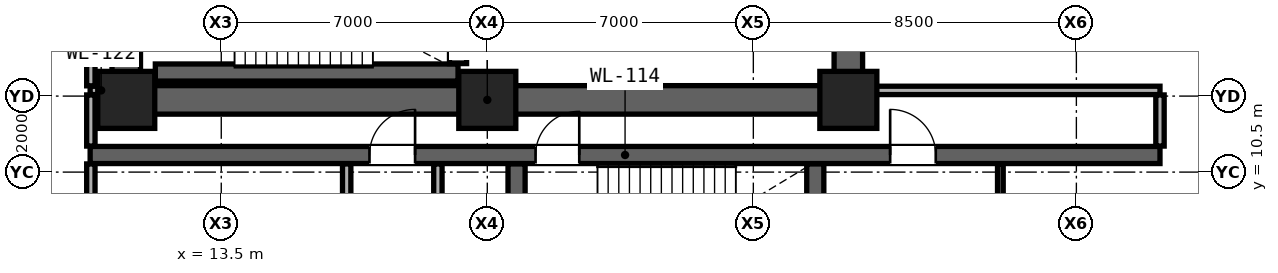
"""IFC4 building model, lengths in metres.
Left out: names, types, materials, properties, quantities, classifications, styles, units other than length and angle.
Written with IfcOpenShell. Run it as: python <this file> out.ifc"""

import sys

from ifc_helpers import new_model, si_unit, direction, frame, frame_2d, origin, origin_2d, place, context, subcontext, project, spatial, rectangle, extrude, element, fill, save


model = new_model("IFC4")
c1 = context("Model", 3, precision=1e-05, world=origin(), true_north=direction((0.0, 1.0)))
c2 = subcontext(c1, "Body", "Model", "MODEL_VIEW")
j1 = project(units=[si_unit("LENGTHUNIT", "METRE"), si_unit("PLANEANGLEUNIT", "RADIAN")], contexts=[c1])
p1 = place(None, origin())
s1 = spatial("IfcSite", under=j1, at=p1, CompositionType="ELEMENT")
p2 = place(p1, origin())
s2 = spatial("IfcBuilding", under=s1, at=p2, CompositionType="ELEMENT")
p3 = place(p2, origin())
s3 = spatial("IfcBuildingStorey", under=s2, at=p3, CompositionType="ELEMENT", Elevation=0.0)
for number, where, z_axis, x_axis in (
    (1, (11.0, 12.4, 0.0), (0.0, 0.0, 1.0), (1.0, 0.0, 0.0)),
    (2, (20.5, 12.4, 0.0), (0.0, 0.0, 1.0), (1.0, 0.0, 0.0)),
    (3, (30.0, 12.4, 0.0), (0.0, 0.0, 1.0), (1.0, 0.0, 0.0)),
):
    element("IfcColumn", number, at=place(p3, frame(where, z_axis=z_axis, x_axis=x_axis)), inside=s3, PredefinedType="COLUMN", context=c2, shape_type="SweptSolid", body=[
        extrude(rectangle(XDim=1.5, YDim=1.5, at=origin_2d()), origin(), (0.0, 0.0, 1.0), 5.2),
    ])
p4 = place(p3, frame((11.0, 12.4, 0.0), z_axis=(0.0, 0.0, 1.0), x_axis=(1.0, 0.0, 0.0)))
e4 = element("IfcWall", 4, at=p4, inside=s3, PredefinedType="SHEAR", context=c2, shape_type="SweptSolid", body=[
    extrude(rectangle(XDim=19.0, YDim=0.75, at=frame_2d((9.5, 0.0))), origin(), (0.0, 0.0, 1.0), 4.88),
])
for number, where, z_axis, x_axis in (
    (5, (11.0, 12.4, 0.0), (0.0, 0.0, 1.0), (0.0, 1.0, 0.0)),
    (6, (30.0, 12.4, 0.0), (0.0, 0.0, 1.0), (0.0, 1.0, 0.0)),
):
    element("IfcWall", number, at=place(p3, frame(where, z_axis=z_axis, x_axis=x_axis)), inside=s3, PredefinedType="SHEAR", context=c2, shape_type="SweptSolid", body=[
        extrude(rectangle(XDim=6.0, YDim=0.75, at=frame_2d((3.0, 0.0))), origin(), (0.0, 0.0, 1.0), 4.88),
    ])
p5 = place(p3, frame((10.05, 10.95, 0.0), z_axis=(0.0, 0.0, 1.0), x_axis=(1.0, 0.0, 0.0)))
e7 = element("IfcWall", 7, at=p5, inside=s3, PredefinedType="SHEAR", context=c2, shape_type="SweptSolid", body=[
    extrude(rectangle(XDim=28.15, YDim=0.45, at=frame_2d((14.075, 0.0))), origin(), (0.0, 0.0, 1.0), 4.88),
])
p6 = place(p5, frame((7.35, 0.0, 0.0)))
e8 = element("IfcOpeningElement", 8, at=p6, cuts=e7, PredefinedType="OPENING", context=c2, shape_type="SweptSolid", body=[
    extrude(rectangle(XDim=1.2, YDim=2.25, at=frame_2d((0.6, 1.125))), frame((0.0, 0.235, 0.0), z_axis=(0.0, -1.0, 0.0), x_axis=(1.0, 0.0, 0.0)), (0.0, 0.0, 1.0), 0.47),
])
p7 = place(p5, frame((11.72, 0.0, 0.0)))
e9 = element("IfcOpeningElement", 9, at=p7, cuts=e7, PredefinedType="OPENING", context=c2, shape_type="SweptSolid", body=[
    extrude(rectangle(XDim=1.15, YDim=2.2, at=frame_2d((0.575, 1.1))), frame((0.0, 0.235, 0.0), z_axis=(0.0, -1.0, 0.0), x_axis=(1.0, 0.0, 0.0)), (0.0, 0.0, 1.0), 0.47),
])
p8 = place(p5, frame((21.05, 0.0, 0.0)))
e10 = element("IfcOpeningElement", 10, at=p8, cuts=e7, PredefinedType="OPENING", context=c2, shape_type="SweptSolid", body=[
    extrude(rectangle(XDim=1.2, YDim=2.25, at=frame_2d((0.6, 1.125))), frame((0.0, 0.235, 0.0), z_axis=(0.0, -1.0, 0.0), x_axis=(1.0, 0.0, 0.0)), (0.0, 0.0, 1.0), 0.47),
])
p9 = place(p3, frame((10.05, 12.65, 0.0), z_axis=(0.0, 0.0, 1.0), x_axis=(1.0, 0.0, 0.0)))
e11 = element("IfcWall", 11, at=p9, inside=s3, PredefinedType="SOLIDWALL", context=c2, shape_type="SweptSolid", body=[
    extrude(rectangle(XDim=0.58, YDim=0.22, at=frame_2d((0.29, 0.0))), origin(), (0.0, 0.0, 1.0), 4.88),
])
p10 = place(p3, frame((30.37, 12.65, 0.0), z_axis=(0.0, 0.0, 1.0), x_axis=(1.0, 0.0, 0.0)))
e12 = element("IfcWall", 12, at=p10, inside=s3, PredefinedType="SOLIDWALL", context=c2, shape_type="SweptSolid", body=[
    extrude(rectangle(XDim=7.83, YDim=0.22, at=frame_2d((3.915, 0.0))), origin(), (0.0, 0.0, 1.0), 3.924),
])
p11 = place(p3, frame((11.765, 13.12, 0.0), z_axis=(0.0, 0.0, 1.0), x_axis=(1.0, 0.0, 0.0)))
e13 = element("IfcWall", 13, at=p11, inside=s3, PredefinedType="SHEAR", context=c2, shape_type="SweptSolid", body=[
    extrude(rectangle(XDim=7.965, YDim=0.45, at=frame_2d((3.982, 0.0))), origin(), (0.0, 0.0, 1.0), 4.88),
])
p12 = place(p3, frame((10.069, 6.92, 0.0), z_axis=(0.0, 0.0, 1.0), x_axis=(0.0, 1.0, 0.0)))
e14 = element("IfcWall", 14, at=p12, inside=s3, PredefinedType="SOLIDWALL", context=c2, shape_type="SweptSolid", body=[
    extrude(rectangle(XDim=3.795, YDim=0.22, at=frame_2d((1.897, 0.0))), origin(), (0.0, 0.0, 1.0), 4.88),
])
p13 = place(p3, frame((10.069, 11.185, 0.0), z_axis=(0.0, 0.0, 1.0), x_axis=(0.0, 1.0, 0.0)))
e15 = element("IfcWall", 15, at=p13, inside=s3, PredefinedType="SOLIDWALL", context=c2, shape_type="SweptSolid", body=[
    extrude(rectangle(XDim=1.345, YDim=0.22, at=frame_2d((0.672, 0.0))), origin(), (0.0, 0.0, 1.0), 4.88),
])
p14 = place(p3, frame((10.069, 12.77, 0.0), z_axis=(0.0, 0.0, 1.0), x_axis=(0.0, 1.0, 0.0)))
e16 = element("IfcWall", 16, at=p14, inside=s3, PredefinedType="SOLIDWALL", context=c2, shape_type="SweptSolid", body=[
    extrude(rectangle(XDim=5.51, YDim=0.22, at=frame_2d((2.755, 0.0))), origin(), (0.0, 0.0, 1.0), 3.772),
])
for number, where, z_axis, x_axis in (
    (17, (16.8, 2.15, 0.0), (0.0, 0.0, 1.0), (0.0, 1.0, 0.0)),
    (18, (19.2, 2.15, 0.0), (0.0, 0.0, 1.0), (0.0, 1.0, 0.0)),
):
    element("IfcWall", number, at=place(p3, frame(where, z_axis=z_axis, x_axis=x_axis)), inside=s3, PredefinedType="SOLIDWALL", context=c2, shape_type="SweptSolid", body=[
        extrude(rectangle(XDim=8.565, YDim=0.22, at=frame_2d((4.283, 0.0))), origin(), (0.0, 0.0, 1.0), 4.099),
    ])
p15 = place(p3, frame((19.73, 13.355, 0.0), z_axis=(0.0, 0.0, 1.0), x_axis=(0.0, 1.0, 0.0)))
e19 = element("IfcWall", 19, at=p15, inside=s3, PredefinedType="SHEAR", context=c2, shape_type="SweptSolid", body=[
    extrude(rectangle(XDim=2.73, YDim=0.45, at=frame_2d((1.365, 0.0))), origin(), (0.0, 0.0, 1.0), 4.88),
])
for number, where, z_axis, x_axis in (
    (20, (21.27, 7.455, 0.0), (0.0, 0.0, 1.0), (0.0, 1.0, 0.0)),
    (21, (29.13, 7.455, 0.0), (0.0, 0.0, 1.0), (0.0, 1.0, 0.0)),
):
    element("IfcWall", number, at=place(p3, frame(where, z_axis=z_axis, x_axis=x_axis)), inside=s3, PredefinedType="SHEAR", context=c2, shape_type="SweptSolid", body=[
        extrude(rectangle(XDim=3.26, YDim=0.45, at=frame_2d((1.63, 0.0))), origin(), (0.0, 0.0, 1.0), 4.88),
    ])
p16 = place(p3, frame((34.0, 2.4, 0.0), z_axis=(0.0, 0.0, 1.0), x_axis=(0.0, 1.0, 0.0)))
e22 = element("IfcWall", 22, at=p16, inside=s3, PredefinedType="PARTITIONING", context=c2, shape_type="SweptSolid", body=[
    extrude(rectangle(XDim=8.315, YDim=0.15, at=frame_2d((4.158, 0.0))), origin(), (0.0, 0.0, 1.0), 4.099),
])
p17 = place(p3, frame((38.2, 11.185, 0.0), z_axis=(0.0, 0.0, 1.0), x_axis=(0.0, 1.0, 0.0)))
e23 = element("IfcWall", 23, at=p17, inside=s3, PredefinedType="SOLIDWALL", context=c2, shape_type="SweptSolid", body=[
    extrude(rectangle(XDim=1.345, YDim=0.22, at=frame_2d((0.672, 0.0))), origin(), (0.0, 0.0, 1.0), 3.924),
])
p18 = place(p6, origin())
e24 = element("IfcDoor", 24, at=p18, inside=s3, OperationType="SINGLE_SWING_RIGHT", PredefinedType="DOOR", context=c2, shape_type="SweptSolid", body=[
    extrude(rectangle(XDim=1.2, YDim=2.25, at=frame_2d((0.6, 1.125))), frame((0.0, 0.025, 0.0), z_axis=(0.0, -1.0, 0.0), x_axis=(1.0, 0.0, 0.0)), (0.0, 0.0, 1.0), 0.05),
])
fill(e8, e24)
p19 = place(p7, origin())
e25 = element("IfcDoor", 25, at=p19, inside=s3, OperationType="SINGLE_SWING_RIGHT", PredefinedType="DOOR", context=c2, shape_type="SweptSolid", body=[
    extrude(rectangle(XDim=1.15, YDim=2.2, at=frame_2d((0.575, 1.1))), frame((0.0, 0.025, 0.0), z_axis=(0.0, -1.0, 0.0), x_axis=(1.0, 0.0, 0.0)), (0.0, 0.0, 1.0), 0.05),
])
fill(e9, e25)
p20 = place(p8, origin())
e26 = element("IfcDoor", 26, at=p20, inside=s3, OperationType="SINGLE_SWING_LEFT", PredefinedType="DOOR", context=c2, shape_type="SweptSolid", body=[
    extrude(rectangle(XDim=1.2, YDim=2.25, at=frame_2d((0.6, 1.125))), frame((0.0, 0.025, 0.0), z_axis=(0.0, -1.0, 0.0), x_axis=(1.0, 0.0, 0.0)), (0.0, 0.0, 1.0), 0.05),
])
fill(e10, e26)
save(model, sys.argv[1])
